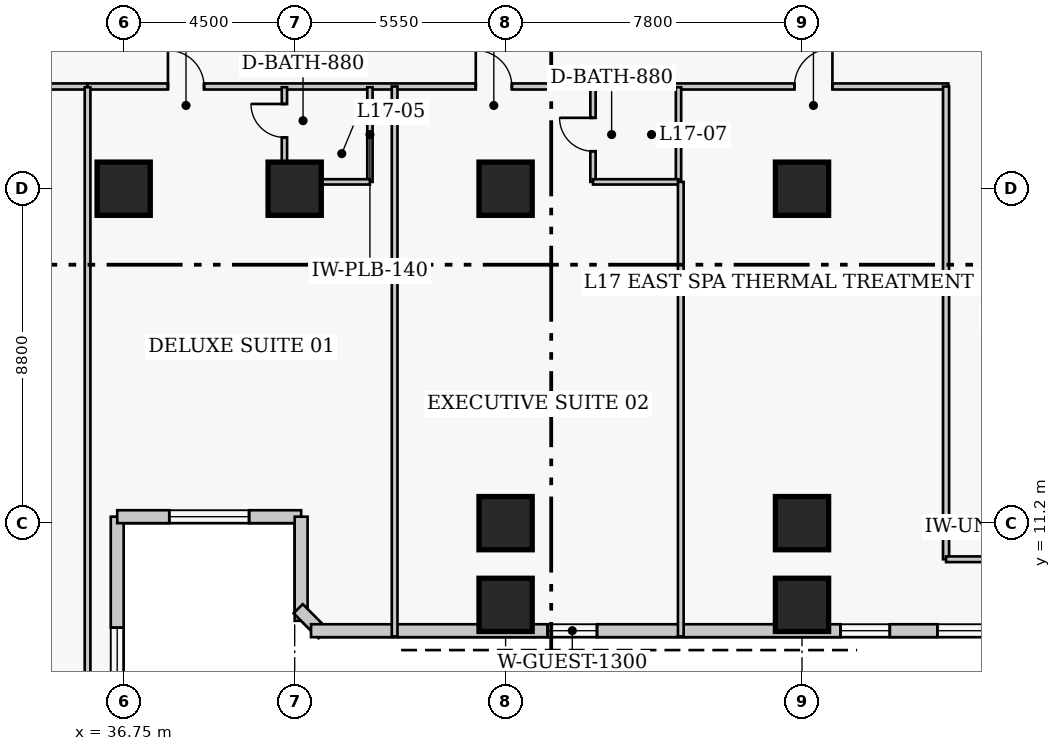
"""IFC4 building model, lengths in metres.
Left out: names, types, materials, properties, quantities, classifications, styles, units other than length and angle.
Written with IfcOpenShell. Run it as: python <this file> out.ifc"""

import sys

from ifc_helpers import new_model, si_unit, direction, frame, frame_2d, origin, origin_2d, place, context, subcontext, project, spatial, rectangle, extrude, element, fill, save


model = new_model("IFC4")
c1 = context("Model", 3, precision=1e-05, world=origin(), true_north=direction((0.0, 1.0)))
c2 = subcontext(c1, "Body", "Model", "MODEL_VIEW")
j1 = project(units=[si_unit("LENGTHUNIT", "METRE"), si_unit("PLANEANGLEUNIT", "RADIAN")], contexts=[c1])
p1 = place(None, origin())
s1 = spatial("IfcSite", under=j1, at=p1, CompositionType="ELEMENT")
p2 = place(p1, origin())
s2 = spatial("IfcBuilding", under=s1, at=p2, CompositionType="ELEMENT")
p3 = place(p2, frame((0.0, 0.0, 71.6)))
s3 = spatial("IfcBuildingStorey", under=s2, at=p3, CompositionType="ELEMENT", Elevation=71.6)
for number, where, z_axis, x_axis in (
    (1, (36.75, 20.0, 0.0), (0.0, 0.0, 1.0), (1.0, 0.0, 0.0)),
    (2, (41.25, 20.0, 0.0), (0.0, 0.0, 1.0), (1.0, 0.0, 0.0)),
    (3, (46.8, 11.2, 0.0), (0.0, 0.0, 1.0), (1.0, 0.0, 0.0)),
    (4, (46.8, 20.0, 0.0), (0.0, 0.0, 1.0), (1.0, 0.0, 0.0)),
    (5, (54.6, 11.2, 0.0), (0.0, 0.0, 1.0), (1.0, 0.0, 0.0)),
    (6, (54.6, 20.0, 0.0), (0.0, 0.0, 1.0), (1.0, 0.0, 0.0)),
    (7, (46.8, 9.05, 0.0), (0.0, 0.0, 1.0), (1.0, 0.0, 0.0)),
    (8, (54.6, 9.05, 0.0), (0.0, 0.0, 1.0), (1.0, 0.0, 0.0)),
):
    element("IfcColumn", number, at=place(p3, frame(where, z_axis=z_axis, x_axis=x_axis)), inside=s3, PredefinedType="COLUMN", context=c2, shape_type="SweptSolid", body=[
        extrude(rectangle(XDim=1.4, YDim=1.4, at=origin_2d()), origin(), (0.0, 0.0, 1.0), 3.8),
    ])
p4 = place(p3, frame((36.58, 3.43, 0.0), z_axis=(0.0, 0.0, 1.0), x_axis=(0.0, 1.0, 0.0)))
e9 = element("IfcWall", 9, at=p4, inside=s3, PredefinedType="SOLIDWALL", context=c2, shape_type="SweptSolid", body=[
    extrude(rectangle(XDim=7.94, YDim=0.34, at=frame_2d((3.97, 0.0))), origin(), (0.0, 0.0, 1.0), 3.42),
])
p5 = place(p4, frame((2.92, 0.0, 0.85)))
e10 = element("IfcOpeningElement", 10, at=p5, cuts=e9, PredefinedType="OPENING", context=c2, shape_type="SweptSolid", body=[
    extrude(rectangle(XDim=2.1, YDim=1.85, at=frame_2d((1.05, 0.925))), frame((0.0, 0.18, 0.0), z_axis=(0.0, -1.0, 0.0), x_axis=(1.0, 0.0, 0.0)), (0.0, 0.0, 1.0), 0.36),
])
p6 = place(p3, frame((36.58, 11.37, 0.0), z_axis=(0.0, 0.0, 1.0), x_axis=(1.0, 0.0, 0.0)))
e11 = element("IfcWall", 11, at=p6, inside=s3, PredefinedType="SOLIDWALL", context=c2, shape_type="SweptSolid", body=[
    extrude(rectangle(XDim=4.84, YDim=0.34, at=frame_2d((2.42, 0.0))), origin(), (0.0, 0.0, 1.0), 3.42),
])
p7 = place(p6, frame((1.37, 0.0, 0.85)))
e12 = element("IfcOpeningElement", 12, at=p7, cuts=e11, PredefinedType="OPENING", context=c2, shape_type="SweptSolid", body=[
    extrude(rectangle(XDim=2.1, YDim=1.85, at=frame_2d((1.05, 0.925))), frame((0.0, 0.18, 0.0), z_axis=(0.0, -1.0, 0.0), x_axis=(1.0, 0.0, 0.0)), (0.0, 0.0, 1.0), 0.36),
])
p8 = place(p3, frame((41.42, 11.37, 0.0), z_axis=(0.0, 0.0, 1.0), x_axis=(0.0, -1.0, 0.0)))
e13 = element("IfcWall", 13, at=p8, inside=s3, PredefinedType="SOLIDWALL", context=c2, shape_type="SweptSolid", body=[
    extrude(rectangle(XDim=2.74, YDim=0.34, at=frame_2d((1.37, 0.0))), origin(), (0.0, 0.0, 1.0), 3.42),
])
p9 = place(p3, frame((41.342, 8.948, 0.0), z_axis=(0.0, 0.0, 1.0), x_axis=(0.707238225886, -0.706975312048, 0.0)))
e14 = element("IfcWall", 14, at=p9, inside=s3, PredefinedType="SOLIDWALL", context=c2, shape_type="SweptSolid", body=[
    extrude(rectangle(XDim=0.929, YDim=0.34, at=frame_2d((0.464, 0.0))), origin(), (0.0, 0.0, 1.0), 3.42),
])
p10 = place(p3, frame((41.68, 8.37, 0.0), z_axis=(0.0, 0.0, 1.0), x_axis=(1.0, 0.0, 0.0)))
e15 = element("IfcWall", 15, at=p10, inside=s3, PredefinedType="SOLIDWALL", context=c2, shape_type="SweptSolid", body=[
    extrude(rectangle(XDim=29.89, YDim=0.34, at=frame_2d((14.945, 0.0))), origin(), (0.0, 0.0, 1.0), 3.42),
])
p11 = place(p10, frame((16.481, 0.0, 0.85)))
e16 = element("IfcOpeningElement", 16, at=p11, cuts=e15, PredefinedType="OPENING", context=c2, shape_type="SweptSolid", body=[
    extrude(rectangle(XDim=2.1, YDim=1.85, at=frame_2d((1.05, 0.925))), frame((0.0, 0.18, 0.0), z_axis=(0.0, -1.0, 0.0), x_axis=(1.0, 0.0, 0.0)), (0.0, 0.0, 1.0), 0.36),
])
p12 = place(p10, frame((26.254, 0.0, 0.85)))
e17 = element("IfcOpeningElement", 17, at=p12, cuts=e15, PredefinedType="OPENING", context=c2, shape_type="SweptSolid", body=[
    extrude(rectangle(XDim=2.1, YDim=1.85, at=frame_2d((1.05, 0.925))), frame((0.0, 0.18, 0.0), z_axis=(0.0, -1.0, 0.0), x_axis=(1.0, 0.0, 0.0)), (0.0, 0.0, 1.0), 0.36),
])
p13 = place(p10, frame((6.225, 0.0, 0.85)))
e18 = element("IfcOpeningElement", 18, at=p13, cuts=e15, PredefinedType="OPENING", context=c2, shape_type="SweptSolid", body=[
    extrude(rectangle(XDim=1.3, YDim=1.7, at=frame_2d((0.65, 0.85))), frame((0.0, 0.18, 0.0), z_axis=(0.0, -1.0, 0.0), x_axis=(1.0, 0.0, 0.0)), (0.0, 0.0, 1.0), 0.36),
])
p14 = place(p10, frame((13.93, 0.0, 0.85)))
e19 = element("IfcOpeningElement", 19, at=p14, cuts=e15, PredefinedType="OPENING", context=c2, shape_type="SweptSolid", body=[
    extrude(rectangle(XDim=1.3, YDim=1.7, at=frame_2d((0.65, 0.85))), frame((0.0, 0.18, 0.0), z_axis=(0.0, -1.0, 0.0), x_axis=(1.0, 0.0, 0.0)), (0.0, 0.0, 1.0), 0.36),
])
p15 = place(p3, frame((19.1, 22.69, 0.0), z_axis=(0.0, 0.0, 1.0), x_axis=(1.0, 0.0, 0.0)))
e20 = element("IfcWall", 20, at=p15, inside=s3, PredefinedType="PARTITIONING", context=c2, shape_type="SweptSolid", body=[
    extrude(rectangle(XDim=16.7, YDim=0.16, at=frame_2d((8.35, 0.0))), origin(), (0.0, 0.0, 1.0), 3.42),
])
p16 = place(p15, frame((7.88, 0.0, 0.0)))
e21 = element("IfcOpeningElement", 21, at=p16, cuts=e20, PredefinedType="OPENING", context=c2, shape_type="SweptSolid", body=[
    extrude(rectangle(XDim=1.0, YDim=2.15, at=frame_2d((0.5, 1.075))), frame((0.0, 0.09, 0.0), z_axis=(0.0, -1.0, 0.0), x_axis=(1.0, 0.0, 0.0)), (0.0, 0.0, 1.0), 0.18),
])
p17 = place(p3, frame((35.8, 22.69, 0.0), z_axis=(0.0, 0.0, 1.0), x_axis=(1.0, 0.0, 0.0)))
e22 = element("IfcWall", 22, at=p17, inside=s3, PredefinedType="PARTITIONING", context=c2, shape_type="SweptSolid", body=[
    extrude(rectangle(XDim=22.65, YDim=0.16, at=frame_2d((11.325, 0.0))), origin(), (0.0, 0.0, 1.0), 3.42),
])
p18 = place(p17, frame((2.115, 0.0, 0.0)))
e23 = element("IfcOpeningElement", 23, at=p18, cuts=e22, PredefinedType="OPENING", context=c2, shape_type="SweptSolid", body=[
    extrude(rectangle(XDim=0.95, YDim=2.1, at=frame_2d((0.475, 1.05))), frame((0.0, 0.09, 0.0), z_axis=(0.0, -1.0, 0.0), x_axis=(1.0, 0.0, 0.0)), (0.0, 0.0, 1.0), 0.18),
])
p19 = place(p17, frame((10.215, 0.0, 0.0)))
e24 = element("IfcOpeningElement", 24, at=p19, cuts=e22, PredefinedType="OPENING", context=c2, shape_type="SweptSolid", body=[
    extrude(rectangle(XDim=0.95, YDim=2.1, at=frame_2d((0.475, 1.05))), frame((0.0, 0.09, 0.0), z_axis=(0.0, -1.0, 0.0), x_axis=(1.0, 0.0, 0.0)), (0.0, 0.0, 1.0), 0.18),
])
p20 = place(p17, frame((18.6, 0.0, 0.0)))
e25 = element("IfcOpeningElement", 25, at=p20, cuts=e22, PredefinedType="OPENING", context=c2, shape_type="SweptSolid", body=[
    extrude(rectangle(XDim=1.0, YDim=2.15, at=frame_2d((0.5, 1.075))), frame((0.0, 0.09, 0.0), z_axis=(0.0, -1.0, 0.0), x_axis=(1.0, 0.0, 0.0)), (0.0, 0.0, 1.0), 0.18),
])
p21 = place(p3, frame((58.39, 10.25, 0.0), z_axis=(0.0, 0.0, 1.0), x_axis=(0.0, 1.0, 0.0)))
e26 = element("IfcWall", 26, at=p21, inside=s3, PredefinedType="PARTITIONING", context=c2, shape_type="SweptSolid", body=[
    extrude(rectangle(XDim=12.44, YDim=0.16, at=frame_2d((6.22, 0.0))), origin(), (0.0, 0.0, 1.0), 2.884),
])
p22 = place(p3, frame((58.39, 10.25, 0.0), z_axis=(0.0, 0.0, 1.0), x_axis=(1.0, 0.0, 0.0)))
e27 = element("IfcWall", 27, at=p22, inside=s3, PredefinedType="PARTITIONING", context=c2, shape_type="SweptSolid", body=[
    extrude(rectangle(XDim=2.22, YDim=0.15, at=frame_2d((1.11, 0.0))), origin(), (0.0, 0.0, 1.0), 3.42),
])
p23 = place(p3, frame((35.8, 3.02, 0.0), z_axis=(0.0, 0.0, 1.0), x_axis=(0.0, 1.0, 0.0)))
e28 = element("IfcWall", 28, at=p23, inside=s3, PredefinedType="PARTITIONING", context=c2, shape_type="SweptSolid", body=[
    extrude(rectangle(XDim=19.65, YDim=0.15, at=frame_2d((9.825, 0.0))), origin(), (0.0, 0.0, 1.0), 3.42),
])
p24 = place(p3, frame((40.98, 20.18, 0.0), z_axis=(0.0, 0.0, 1.0), x_axis=(0.0, 1.0, 0.0)))
e29 = element("IfcWall", 29, at=p24, inside=s3, PredefinedType="PLUMBINGWALL", context=c2, shape_type="SweptSolid", body=[
    extrude(rectangle(XDim=2.49, YDim=0.14, at=frame_2d((1.245, 0.0))), origin(), (0.0, 0.0, 1.0), 3.42),
])
p25 = place(p24, frame((1.17, 0.0, 0.0)))
e30 = element("IfcOpeningElement", 30, at=p25, cuts=e29, PredefinedType="OPENING", context=c2, shape_type="SweptSolid", body=[
    extrude(rectangle(XDim=0.88, YDim=2.05, at=frame_2d((0.44, 1.025))), frame((0.0, 0.08, 0.0), z_axis=(0.0, -1.0, 0.0), x_axis=(1.0, 0.0, 0.0)), (0.0, 0.0, 1.0), 0.16),
])
p26 = place(p3, frame((43.23, 20.18, 0.0), z_axis=(0.0, 0.0, 1.0), x_axis=(0.0, 1.0, 0.0)))
e31 = element("IfcWall", 31, at=p26, inside=s3, PredefinedType="PLUMBINGWALL", context=c2, shape_type="SweptSolid", body=[
    extrude(rectangle(XDim=2.49, YDim=0.14, at=frame_2d((1.245, 0.0))), origin(), (0.0, 0.0, 1.0), 3.42),
])
p27 = place(p3, frame((40.98, 20.18, 0.0), z_axis=(0.0, 0.0, 1.0), x_axis=(1.0, 0.0, 0.0)))
e32 = element("IfcWall", 32, at=p27, inside=s3, PredefinedType="PLUMBINGWALL", context=c2, shape_type="SweptSolid", body=[
    extrude(rectangle(XDim=2.25, YDim=0.14, at=frame_2d((1.125, 0.0))), origin(), (0.0, 0.0, 1.0), 2.473),
])
p28 = place(p3, frame((43.88, 8.22, 0.0), z_axis=(0.0, 0.0, 1.0), x_axis=(0.0, 1.0, 0.0)))
e33 = element("IfcWall", 33, at=p28, inside=s3, PredefinedType="PARTITIONING", context=c2, shape_type="SweptSolid", body=[
    extrude(rectangle(XDim=14.47, YDim=0.15, at=frame_2d((7.235, 0.0))), origin(), (0.0, 0.0, 1.0), 3.42),
])
p29 = place(p3, frame((49.1, 20.18, 0.0), z_axis=(0.0, 0.0, 1.0), x_axis=(0.0, 1.0, 0.0)))
e34 = element("IfcWall", 34, at=p29, inside=s3, PredefinedType="PLUMBINGWALL", context=c2, shape_type="SweptSolid", body=[
    extrude(rectangle(XDim=2.49, YDim=0.14, at=frame_2d((1.245, 0.0))), origin(), (0.0, 0.0, 1.0), 3.42),
])
p30 = place(p29, frame((0.805, 0.0, 0.0)))
e35 = element("IfcOpeningElement", 35, at=p30, cuts=e34, PredefinedType="OPENING", context=c2, shape_type="SweptSolid", body=[
    extrude(rectangle(XDim=0.88, YDim=2.05, at=frame_2d((0.44, 1.025))), frame((0.0, 0.08, 0.0), z_axis=(0.0, -1.0, 0.0), x_axis=(1.0, 0.0, 0.0)), (0.0, 0.0, 1.0), 0.16),
])
p31 = place(p3, frame((51.35, 20.18, 0.0), z_axis=(0.0, 0.0, 1.0), x_axis=(0.0, 1.0, 0.0)))
e36 = element("IfcWall", 36, at=p31, inside=s3, PredefinedType="PLUMBINGWALL", context=c2, shape_type="SweptSolid", body=[
    extrude(rectangle(XDim=2.49, YDim=0.14, at=frame_2d((1.245, 0.0))), origin(), (0.0, 0.0, 1.0), 3.42),
])
p32 = place(p3, frame((49.1, 20.18, 0.0), z_axis=(0.0, 0.0, 1.0), x_axis=(1.0, 0.0, 0.0)))
e37 = element("IfcWall", 37, at=p32, inside=s3, PredefinedType="PLUMBINGWALL", context=c2, shape_type="SweptSolid", body=[
    extrude(rectangle(XDim=2.25, YDim=0.14, at=frame_2d((1.125, 0.0))), origin(), (0.0, 0.0, 1.0), 2.473),
])
p33 = place(p3, frame((51.41, 8.22, 0.0), z_axis=(0.0, 0.0, 1.0), x_axis=(0.0, 1.0, 0.0)))
e38 = element("IfcWall", 38, at=p33, inside=s3, PredefinedType="PARTITIONING", context=c2, shape_type="SweptSolid", body=[
    extrude(rectangle(XDim=11.96, YDim=0.15, at=frame_2d((5.98, 0.0))), origin(), (0.0, 0.0, 1.0), 3.42),
])
p34 = place(p5, origin())
e39 = element("IfcWindow", 39, at=p34, inside=s3, PartitioningType="SINGLE_PANEL", PredefinedType="WINDOW", context=c2, shape_type="SweptSolid", body=[
    extrude(rectangle(XDim=2.1, YDim=1.85, at=frame_2d((1.05, 0.925))), frame((0.0, 0.03, 0.0), z_axis=(0.0, -1.0, 0.0), x_axis=(1.0, 0.0, 0.0)), (0.0, 0.0, 1.0), 0.06),
])
fill(e10, e39)
p35 = place(p7, origin())
e40 = element("IfcWindow", 40, at=p35, inside=s3, PartitioningType="SINGLE_PANEL", PredefinedType="WINDOW", context=c2, shape_type="SweptSolid", body=[
    extrude(rectangle(XDim=2.1, YDim=1.85, at=frame_2d((1.05, 0.925))), frame((0.0, 0.03, 0.0), z_axis=(0.0, -1.0, 0.0), x_axis=(1.0, 0.0, 0.0)), (0.0, 0.0, 1.0), 0.06),
])
fill(e12, e40)
p36 = place(p11, origin())
e41 = element("IfcWindow", 41, at=p36, inside=s3, PartitioningType="SINGLE_PANEL", PredefinedType="WINDOW", context=c2, shape_type="SweptSolid", body=[
    extrude(rectangle(XDim=2.1, YDim=1.85, at=frame_2d((1.05, 0.925))), frame((0.0, 0.03, 0.0), z_axis=(0.0, -1.0, 0.0), x_axis=(1.0, 0.0, 0.0)), (0.0, 0.0, 1.0), 0.06),
])
fill(e16, e41)
p37 = place(p13, origin())
e42 = element("IfcWindow", 42, at=p37, inside=s3, PartitioningType="SINGLE_PANEL", PredefinedType="WINDOW", context=c2, shape_type="SweptSolid", body=[
    extrude(rectangle(XDim=1.3, YDim=1.7, at=frame_2d((0.65, 0.85))), frame((0.0, 0.03, 0.0), z_axis=(0.0, -1.0, 0.0), x_axis=(1.0, 0.0, 0.0)), (0.0, 0.0, 1.0), 0.06),
])
fill(e18, e42)
p38 = place(p14, origin())
e43 = element("IfcWindow", 43, at=p38, inside=s3, PartitioningType="SINGLE_PANEL", PredefinedType="WINDOW", context=c2, shape_type="SweptSolid", body=[
    extrude(rectangle(XDim=1.3, YDim=1.7, at=frame_2d((0.65, 0.85))), frame((0.0, 0.03, 0.0), z_axis=(0.0, -1.0, 0.0), x_axis=(1.0, 0.0, 0.0)), (0.0, 0.0, 1.0), 0.06),
])
fill(e19, e43)
p39 = place(p25, origin())
e44 = element("IfcDoor", 44, at=p39, inside=s3, OperationType="SINGLE_SWING_RIGHT", PredefinedType="DOOR", context=c2, shape_type="SweptSolid", body=[
    extrude(rectangle(XDim=0.88, YDim=2.05, at=frame_2d((0.44, 1.025))), frame((0.0, 0.025, 0.0), z_axis=(0.0, -1.0, 0.0), x_axis=(1.0, 0.0, 0.0)), (0.0, 0.0, 1.0), 0.05),
])
fill(e30, e44)
p40 = place(p18, origin())
e45 = element("IfcDoor", 45, at=p40, inside=s3, OperationType="SINGLE_SWING_LEFT", PredefinedType="DOOR", context=c2, shape_type="SweptSolid", body=[
    extrude(rectangle(XDim=0.95, YDim=2.1, at=frame_2d((0.475, 1.05))), frame((0.0, 0.025, 0.0), z_axis=(0.0, -1.0, 0.0), x_axis=(1.0, 0.0, 0.0)), (0.0, 0.0, 1.0), 0.05),
])
fill(e23, e45)
p41 = place(p30, origin())
e46 = element("IfcDoor", 46, at=p41, inside=s3, OperationType="SINGLE_SWING_RIGHT", PredefinedType="DOOR", context=c2, shape_type="SweptSolid", body=[
    extrude(rectangle(XDim=0.88, YDim=2.05, at=frame_2d((0.44, 1.025))), frame((0.0, 0.025, 0.0), z_axis=(0.0, -1.0, 0.0), x_axis=(1.0, 0.0, 0.0)), (0.0, 0.0, 1.0), 0.05),
])
fill(e35, e46)
p42 = place(p19, origin())
e47 = element("IfcDoor", 47, at=p42, inside=s3, OperationType="SINGLE_SWING_LEFT", PredefinedType="DOOR", context=c2, shape_type="SweptSolid", body=[
    extrude(rectangle(XDim=0.95, YDim=2.1, at=frame_2d((0.475, 1.05))), frame((0.0, 0.025, 0.0), z_axis=(0.0, -1.0, 0.0), x_axis=(1.0, 0.0, 0.0)), (0.0, 0.0, 1.0), 0.05),
])
fill(e24, e47)
p43 = place(p20, origin())
e48 = element("IfcDoor", 48, at=p43, inside=s3, OperationType="SINGLE_SWING_RIGHT", PredefinedType="DOOR", context=c2, shape_type="SweptSolid", body=[
    extrude(rectangle(XDim=1.0, YDim=2.15, at=frame_2d((0.5, 1.075))), frame((0.0, 0.025, 0.0), z_axis=(0.0, -1.0, 0.0), x_axis=(1.0, 0.0, 0.0)), (0.0, 0.0, 1.0), 0.05),
])
fill(e25, e48)
save(model, sys.argv[1])
